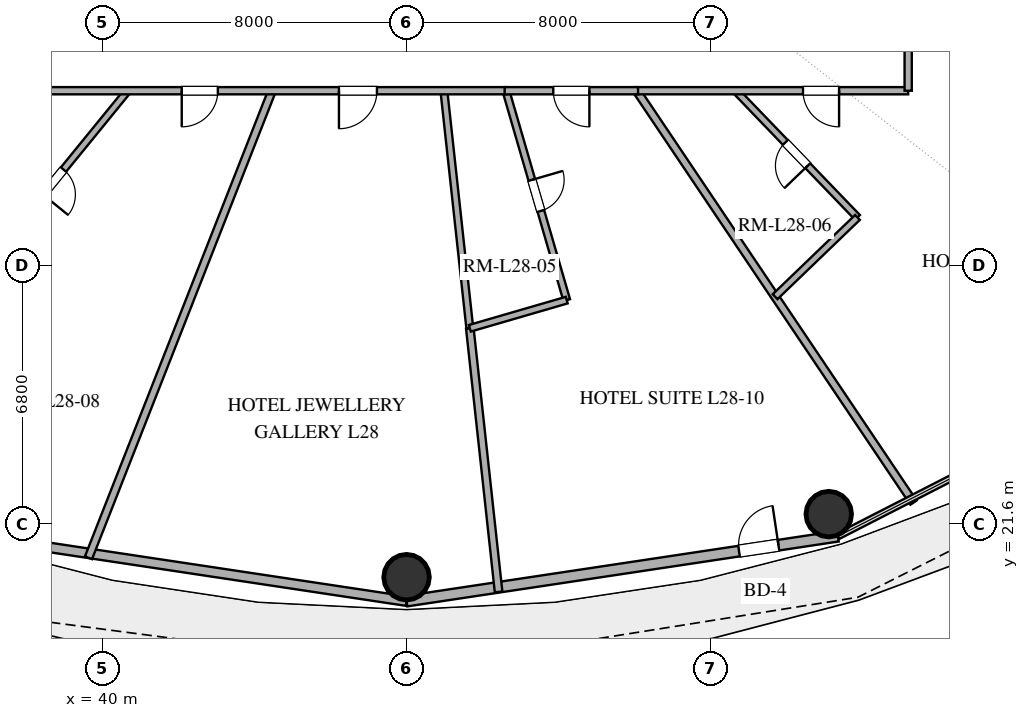
"""IFC4 building model, lengths in metres.
Left out: names, types, materials, properties, quantities, classifications, styles, units other than length and angle.
Written with IfcOpenShell. Run it as: python <this file> out.ifc"""

import sys

from ifc_helpers import new_model, si_unit, direction, frame, frame_2d, origin, origin_2d, place, context, subcontext, project, spatial, rectangle, hollow_circle, extrude, element, fill, save


model = new_model("IFC4")
c1 = context("Model", 3, precision=1e-05, world=origin(), true_north=direction((0.0, 1.0)))
c2 = subcontext(c1, "Body", "Model", "MODEL_VIEW")
j1 = project(units=[si_unit("LENGTHUNIT", "METRE"), si_unit("PLANEANGLEUNIT", "RADIAN")], contexts=[c1])
p1 = place(None, origin())
s1 = spatial("IfcSite", under=j1, at=p1, CompositionType="ELEMENT")
p2 = place(p1, origin())
s2 = spatial("IfcBuilding", under=s1, at=p2, CompositionType="ELEMENT")
p3 = place(p2, frame((0.0, 0.0, 112.8)))
s3 = spatial("IfcBuildingStorey", under=s2, at=p3, CompositionType="ELEMENT", Elevation=112.8)
for number, where, z_axis, x_axis in (
    (1, (48.0, 20.2, 0.0), (0.0, 0.0, 1.0), (1.0, 0.0, 0.0)),
    (2, (59.11, 21.859, 0.0), (0.0, 0.0, 1.0), (1.0, 0.0, 0.0)),
):
    element("IfcColumn", number, at=place(p3, frame(where, z_axis=z_axis, x_axis=x_axis)), inside=s3, PredefinedType="COLUMN", context=c2, shape_type="SweptSolid", body=[
        extrude(hollow_circle(Radius=0.6, WallThickness=0.032, at=origin_2d()), origin(), (0.0, 0.0, 1.0), 3.38),
    ])
p4 = place(p3, frame((36.649, 21.277, 0.0), z_axis=(0.0, 0.0, 1.0), x_axis=(0.988877774656, -0.148730450117, 0.0)))
e3 = element("IfcWall", 3, at=p4, inside=s3, PredefinedType="SOLIDWALL", context=c2, shape_type="SweptSolid", body=[
    extrude(rectangle(XDim=11.479, YDim=0.25, at=frame_2d((5.74, 0.0))), origin(), (0.0, 0.0, 1.0), 3.38),
])
p5 = place(p3, frame((48.0, 19.57, 0.0), z_axis=(0.0, 0.0, 1.0), x_axis=(0.988877774656, 0.148730450117, 0.0)))
e4 = element("IfcWall", 4, at=p5, inside=s3, PredefinedType="SOLIDWALL", context=c2, shape_type="SweptSolid", body=[
    extrude(rectangle(XDim=11.479, YDim=0.28, at=frame_2d((5.74, 0.0))), origin(), (0.0, 0.0, 1.0), 3.38),
])
p6 = place(p5, frame((8.847, 0.0, 0.0)))
e5 = element("IfcOpeningElement", 5, at=p6, cuts=e4, PredefinedType="OPENING", context=c2, shape_type="SweptSolid", body=[
    extrude(rectangle(XDim=1.05, YDim=2.2, at=frame_2d((0.525, 1.1))), frame((0.0, 0.15, 0.0), z_axis=(0.0, -1.0, 0.0), x_axis=(1.0, 0.0, 0.0)), (0.0, 0.0, 1.0), 0.3),
])
p7 = place(p3, frame((39.63, 20.711, 0.0), z_axis=(0.0, 0.0, 1.0), x_axis=(0.365888605627, 0.930658652929, 0.0)))
e6 = element("IfcWall", 6, at=p7, inside=s3, PredefinedType="PARTITIONING", context=c2, shape_type="SweptSolid", body=[
    extrude(rectangle(XDim=13.205, YDim=0.2, at=frame_2d((6.603, 0.0))), origin(), (0.0, 0.0, 1.0), 2.74),
])
p8 = place(p3, frame((50.422, 19.813, 0.0), z_axis=(0.0, 0.0, 1.0), x_axis=(-0.108534266563, 0.994092708444, 0.0)))
e7 = element("IfcWall", 7, at=p8, inside=s3, PredefinedType="PARTITIONING", context=c2, shape_type="SweptSolid", body=[
    extrude(rectangle(XDim=6.978, YDim=0.2, at=frame_2d((3.489, 0.0))), origin(), (0.0, 0.0, 1.0), 2.74),
])
p9 = place(p3, frame((54.053, 33.0, 0.0), z_axis=(0.0, 0.0, 1.0), x_axis=(0.558073496329, -0.829791523634, 0.0)))
e8 = element("IfcWall", 8, at=p9, inside=s3, PredefinedType="PARTITIONING", context=c2, shape_type="SweptSolid", body=[
    extrude(rectangle(XDim=13.06, YDim=0.2, at=frame_2d((6.53, 0.0))), origin(), (0.0, 0.0, 1.0), 2.74),
])
p10 = place(p3, frame((49.665, 26.75, 0.0), z_axis=(0.0, 0.0, 1.0), x_axis=(-0.108526347032, 0.99409357306, 0.0)))
e9 = element("IfcWall", 9, at=p10, inside=s3, PredefinedType="PLUMBINGWALL", context=c2, shape_type="SweptSolid", body=[
    extrude(rectangle(XDim=6.288, YDim=0.18, at=frame_2d((3.144, 0.0))), origin(), (0.0, 0.0, 1.0), 2.74),
])
p11 = place(p3, frame((40.664, 33.0, 0.0), z_axis=(0.0, 0.0, 1.0), x_axis=(-0.631841179317, -0.775097880347, 0.0)))
e10 = element("IfcWall", 10, at=p11, inside=s3, PredefinedType="PLUMBINGWALL", context=c2, shape_type="SweptSolid", body=[
    extrude(rectangle(XDim=6.202, YDim=0.18, at=frame_2d((3.101, 0.0))), origin(), (0.0, 0.0, 1.0), 2.74),
])
p12 = place(p11, frame((2.676, 0.0, 0.0)))
e11 = element("IfcOpeningElement", 11, at=p12, cuts=e10, PredefinedType="OPENING", context=c2, shape_type="SweptSolid", body=[
    extrude(rectangle(XDim=0.85, YDim=2.1, at=frame_2d((0.425, 1.05))), frame((0.0, 0.1, 0.0), z_axis=(0.0, -1.0, 0.0), x_axis=(1.0, 0.0, 0.0)), (0.0, 0.0, 1.0), 0.2),
])
p13 = place(p3, frame((50.615, 33.0, 0.0), z_axis=(0.0, 0.0, 1.0), x_axis=(0.278967165891, -0.960300640609, 0.0)))
e12 = element("IfcWall", 12, at=p13, inside=s3, PredefinedType="PLUMBINGWALL", context=c2, shape_type="SweptSolid", body=[
    extrude(rectangle(XDim=5.738, YDim=0.18, at=frame_2d((2.869, 0.0))), origin(), (0.0, 0.0, 1.0), 2.74),
])
p14 = place(p13, frame((2.444, 0.0, 0.0)))
e13 = element("IfcOpeningElement", 13, at=p14, cuts=e12, PredefinedType="OPENING", context=c2, shape_type="SweptSolid", body=[
    extrude(rectangle(XDim=0.85, YDim=2.1, at=frame_2d((0.425, 1.05))), frame((0.0, 0.1, 0.0), z_axis=(0.0, -1.0, 0.0), x_axis=(1.0, 0.0, 0.0)), (0.0, 0.0, 1.0), 0.2),
])
p15 = place(p3, frame((66.243, 32.143, 0.0), z_axis=(0.0, 0.0, 1.0), x_axis=(-0.879784992633, 0.475371819461, 0.0)))
e14 = element("IfcWall", 14, at=p15, inside=s3, PredefinedType="PLUMBINGWALL", context=c2, shape_type="SweptSolid", body=[
    extrude(rectangle(XDim=5.732, YDim=0.18, at=frame_2d((2.866, 0.0))), origin(), (0.0, 0.0, 1.0), 2.74),
])
p16 = place(p3, frame((59.866, 29.666, 0.0), z_axis=(0.0, 0.0, 1.0), x_axis=(-0.693306956927, 0.720642396392, 0.0)))
e15 = element("IfcWall", 15, at=p16, inside=s3, PredefinedType="PLUMBINGWALL", context=c2, shape_type="SweptSolid", body=[
    extrude(rectangle(XDim=4.626, YDim=0.18, at=frame_2d((2.313, 0.0))), origin(), (0.0, 0.0, 1.0), 2.74),
])
p17 = place(p16, frame((1.888, 0.0, 0.0)))
e16 = element("IfcOpeningElement", 16, at=p17, cuts=e15, PredefinedType="OPENING", context=c2, shape_type="SweptSolid", body=[
    extrude(rectangle(XDim=0.85, YDim=2.1, at=frame_2d((0.425, 1.05))), frame((0.0, 0.1, 0.0), z_axis=(0.0, -1.0, 0.0), x_axis=(1.0, 0.0, 0.0)), (0.0, 0.0, 1.0), 0.2),
])
p18 = place(p3, frame((50.648, 33.0, 0.0), z_axis=(0.0, 0.0, 1.0), x_axis=(-1.0, 0.0, 0.0)))
e17 = element("IfcWall", 17, at=p18, inside=s3, PredefinedType="PARTITIONING", context=c2, shape_type="SweptSolid", body=[
    extrude(rectangle(XDim=15.848, YDim=0.19, at=frame_2d((7.924, 0.0))), origin(), (0.0, 0.0, 1.0), 2.74),
])
p19 = place(p18, frame((3.427, 0.0, 0.0)))
e18 = element("IfcOpeningElement", 18, at=p19, cuts=e17, PredefinedType="OPENING", context=c2, shape_type="SweptSolid", body=[
    extrude(rectangle(XDim=1.0, YDim=2.2, at=frame_2d((0.5, 1.1))), frame((0.0, 0.105, 0.0), z_axis=(0.0, -1.0, 0.0), x_axis=(1.0, 0.0, 0.0)), (0.0, 0.0, 1.0), 0.21),
])
p20 = place(p18, frame((7.614, 0.0, 0.0)))
e19 = element("IfcOpeningElement", 19, at=p20, cuts=e17, PredefinedType="OPENING", context=c2, shape_type="SweptSolid", body=[
    extrude(rectangle(XDim=0.95, YDim=2.15, at=frame_2d((0.475, 1.075))), frame((0.0, 0.105, 0.0), z_axis=(0.0, -1.0, 0.0), x_axis=(1.0, 0.0, 0.0)), (0.0, 0.0, 1.0), 0.21),
])
p21 = place(p3, frame((61.2, 33.0, 0.0), z_axis=(0.0, 0.0, 1.0), x_axis=(-1.0, 0.0, 0.0)))
e20 = element("IfcWall", 20, at=p21, inside=s3, PredefinedType="PARTITIONING", context=c2, shape_type="SweptSolid", body=[
    extrude(rectangle(XDim=7.186, YDim=0.19, at=frame_2d((3.593, 0.0))), origin(), (0.0, 0.0, 1.0), 2.74),
])
p22 = place(p21, frame((1.818, 0.0, 0.0)))
e21 = element("IfcOpeningElement", 21, at=p22, cuts=e20, PredefinedType="OPENING", context=c2, shape_type="SweptSolid", body=[
    extrude(rectangle(XDim=0.95, YDim=2.15, at=frame_2d((0.475, 1.075))), frame((0.0, 0.105, 0.0), z_axis=(0.0, -1.0, 0.0), x_axis=(1.0, 0.0, 0.0)), (0.0, 0.0, 1.0), 0.21),
])
p23 = place(p3, frame((61.2, 41.873, 0.0), z_axis=(0.0, 0.0, 1.0), x_axis=(0.0, -1.0, 0.0)))
e22 = element("IfcWall", 22, at=p23, inside=s3, PredefinedType="PARTITIONING", context=c2, shape_type="SweptSolid", body=[
    extrude(rectangle(XDim=8.873, YDim=0.19, at=frame_2d((4.436, 0.0))), origin(), (0.0, 0.0, 1.0), 2.74),
])
p24 = place(p23, frame((1.676, 0.0, 0.0)))
e23 = element("IfcOpeningElement", 23, at=p24, cuts=e22, PredefinedType="OPENING", context=c2, shape_type="SweptSolid", body=[
    extrude(rectangle(XDim=0.95, YDim=2.15, at=frame_2d((0.475, 1.075))), frame((0.0, 0.105, 0.0), z_axis=(0.0, -1.0, 0.0), x_axis=(1.0, 0.0, 0.0)), (0.0, 0.0, 1.0), 0.21),
])
p25 = place(p3, frame((54.092, 33.0, 0.0), z_axis=(0.0, 0.0, 1.0), x_axis=(-1.0, 0.0, 0.0)))
e24 = element("IfcWall", 24, at=p25, inside=s3, PredefinedType="PARTITIONING", context=c2, shape_type="SweptSolid", body=[
    extrude(rectangle(XDim=3.51, YDim=0.19, at=frame_2d((1.755, 0.0))), origin(), (0.0, 0.0, 1.0), 2.74),
])
p26 = place(p25, frame((1.28, 0.0, 0.0)))
e25 = element("IfcOpeningElement", 25, at=p26, cuts=e24, PredefinedType="OPENING", context=c2, shape_type="SweptSolid", body=[
    extrude(rectangle(XDim=0.95, YDim=2.15, at=frame_2d((0.475, 1.075))), frame((0.0, 0.105, 0.0), z_axis=(0.0, -1.0, 0.0), x_axis=(1.0, 0.0, 0.0)), (0.0, 0.0, 1.0), 0.21),
])
p27 = place(p3, frame((57.698, 27.58, 0.0), z_axis=(0.0, 0.0, 1.0), x_axis=(0.720688028056, 0.693259522991, 0.0)))
e26 = element("IfcWall", 26, at=p27, inside=s3, PredefinedType="PLUMBINGWALL", context=c2, shape_type="SweptSolid", body=[
    extrude(rectangle(XDim=3.009, YDim=0.18, at=frame_2d((1.504, 0.0))), origin(), (0.0, 0.0, 1.0), 2.74),
])
p28 = place(p3, frame((52.215, 27.49, 0.0), z_axis=(0.0, 0.0, 1.0), x_axis=(-0.960314459225, -0.278919593078, 0.0)))
e27 = element("IfcWall", 27, at=p28, inside=s3, PredefinedType="PLUMBINGWALL", context=c2, shape_type="SweptSolid", body=[
    extrude(rectangle(XDim=2.656, YDim=0.18, at=frame_2d((1.328, 0.0))), origin(), (0.0, 0.0, 1.0), 2.74),
])
p29 = place(p6, origin())
e28 = element("IfcDoor", 28, at=p29, inside=s3, OperationType="SINGLE_SWING_RIGHT", PredefinedType="DOOR", context=c2, shape_type="SweptSolid", body=[
    extrude(rectangle(XDim=1.05, YDim=2.2, at=frame_2d((0.525, 1.1))), frame((0.0, 0.025, 0.0), z_axis=(0.0, -1.0, 0.0), x_axis=(1.0, 0.0, 0.0)), (0.0, 0.0, 1.0), 0.05),
])
fill(e5, e28)
p30 = place(p12, origin())
e29 = element("IfcDoor", 29, at=p30, inside=s3, OperationType="SINGLE_SWING_RIGHT", PredefinedType="DOOR", context=c2, shape_type="SweptSolid", body=[
    extrude(rectangle(XDim=0.85, YDim=2.1, at=frame_2d((0.425, 1.05))), frame((0.0, 0.025, 0.0), z_axis=(0.0, -1.0, 0.0), x_axis=(1.0, 0.0, 0.0)), (0.0, 0.0, 1.0), 0.05),
])
fill(e11, e29)
p31 = place(p14, origin())
e30 = element("IfcDoor", 30, at=p31, inside=s3, OperationType="SINGLE_SWING_LEFT", PredefinedType="DOOR", context=c2, shape_type="SweptSolid", body=[
    extrude(rectangle(XDim=0.85, YDim=2.1, at=frame_2d((0.425, 1.05))), frame((0.0, 0.025, 0.0), z_axis=(0.0, -1.0, 0.0), x_axis=(1.0, 0.0, 0.0)), (0.0, 0.0, 1.0), 0.05),
])
fill(e13, e30)
p32 = place(p17, origin())
e31 = element("IfcDoor", 31, at=p32, inside=s3, OperationType="SINGLE_SWING_LEFT", PredefinedType="DOOR", context=c2, shape_type="SweptSolid", body=[
    extrude(rectangle(XDim=0.85, YDim=2.1, at=frame_2d((0.425, 1.05))), frame((0.0, 0.025, 0.0), z_axis=(0.0, -1.0, 0.0), x_axis=(1.0, 0.0, 0.0)), (0.0, 0.0, 1.0), 0.05),
])
fill(e16, e31)
p33 = place(p19, origin())
e32 = element("IfcDoor", 32, at=p33, inside=s3, OperationType="SINGLE_SWING_RIGHT", PredefinedType="DOOR", context=c2, shape_type="SweptSolid", body=[
    extrude(rectangle(XDim=1.0, YDim=2.2, at=frame_2d((0.5, 1.1))), frame((0.0, 0.025, 0.0), z_axis=(0.0, -1.0, 0.0), x_axis=(1.0, 0.0, 0.0)), (0.0, 0.0, 1.0), 0.05),
])
fill(e18, e32)
p34 = place(p20, origin())
e33 = element("IfcDoor", 33, at=p34, inside=s3, OperationType="SINGLE_SWING_RIGHT", PredefinedType="DOOR", context=c2, shape_type="SweptSolid", body=[
    extrude(rectangle(XDim=0.95, YDim=2.15, at=frame_2d((0.475, 1.075))), frame((0.0, 0.025, 0.0), z_axis=(0.0, -1.0, 0.0), x_axis=(1.0, 0.0, 0.0)), (0.0, 0.0, 1.0), 0.05),
])
fill(e19, e33)
p35 = place(p22, origin())
e34 = element("IfcDoor", 34, at=p35, inside=s3, OperationType="SINGLE_SWING_LEFT", PredefinedType="DOOR", context=c2, shape_type="SweptSolid", body=[
    extrude(rectangle(XDim=0.95, YDim=2.15, at=frame_2d((0.475, 1.075))), frame((0.0, 0.025, 0.0), z_axis=(0.0, -1.0, 0.0), x_axis=(1.0, 0.0, 0.0)), (0.0, 0.0, 1.0), 0.05),
])
fill(e21, e34)
p36 = place(p26, origin())
e35 = element("IfcDoor", 35, at=p36, inside=s3, OperationType="SINGLE_SWING_LEFT", PredefinedType="DOOR", context=c2, shape_type="SweptSolid", body=[
    extrude(rectangle(XDim=0.95, YDim=2.15, at=frame_2d((0.475, 1.075))), frame((0.0, 0.025, 0.0), z_axis=(0.0, -1.0, 0.0), x_axis=(1.0, 0.0, 0.0)), (0.0, 0.0, 1.0), 0.05),
])
fill(e25, e35)
save(model, sys.argv[1])
